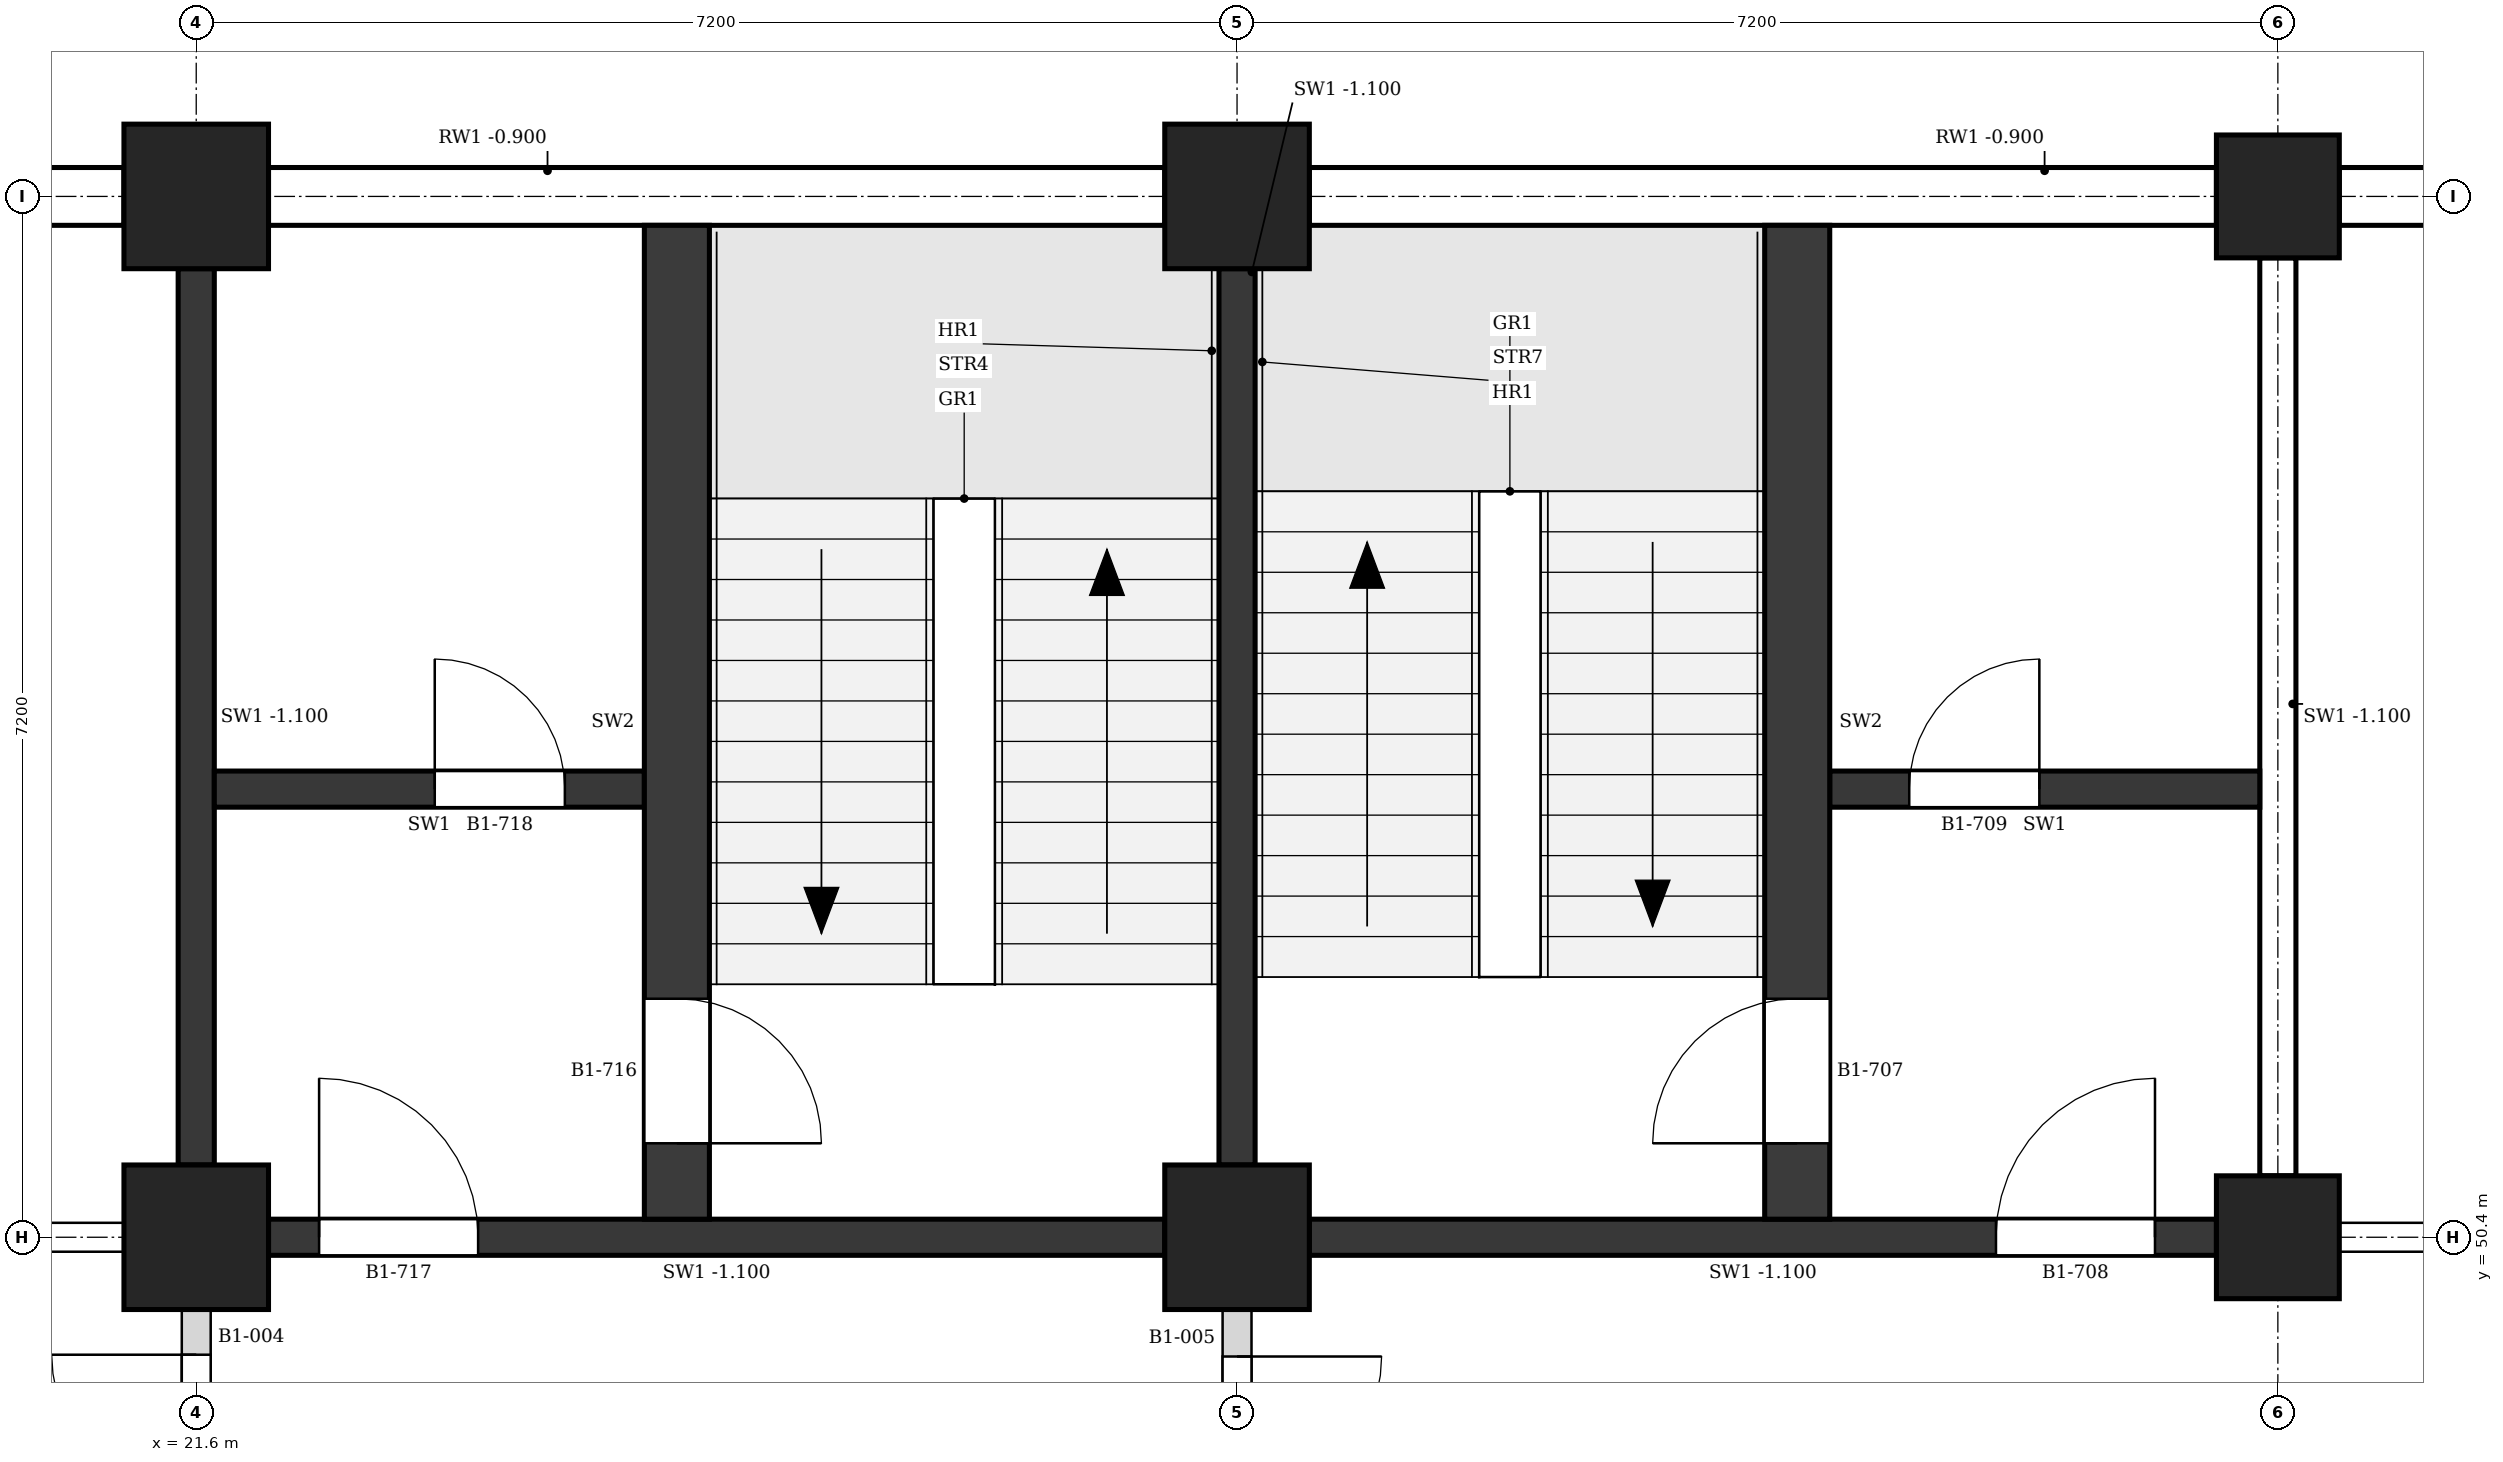
"""IFC4 building model, lengths in metres.
Left out: names, types, materials, properties, quantities, classifications, styles, units other than length and angle.
Written with IfcOpenShell. Run it as: python <this file> out.ifc"""

import sys

from ifc_helpers import new_model, si_unit, direction, frame, frame_2d, origin, origin_2d, place, context, subcontext, project, spatial, rectangle, extrude, element, fill, save


model = new_model("IFC4")
c1 = context("Model", 3, precision=1e-05, world=origin(), true_north=direction((0.0, 1.0)))
c2 = subcontext(c1, "Body", "Model", "MODEL_VIEW")
j1 = project(units=[si_unit("LENGTHUNIT", "METRE"), si_unit("PLANEANGLEUNIT", "RADIAN")], contexts=[c1])
p1 = place(None, origin())
s1 = spatial("IfcSite", under=j1, at=p1, CompositionType="ELEMENT")
p2 = place(p1, origin())
s2 = spatial("IfcBuilding", under=s1, at=p2, CompositionType="ELEMENT")
p3 = place(p2, frame((0.0, 0.0, -4.5)))
s3 = spatial("IfcBuildingStorey", under=s2, at=p3, CompositionType="ELEMENT", Elevation=-4.5)
for number, where, z_axis, x_axis in (
    (1, (21.6, 50.4, 0.0), (0.0, 0.0, 1.0), (1.0, 0.0, 0.0)),
    (2, (21.6, 57.6, 0.0), (0.0, 0.0, 1.0), (1.0, 0.0, 0.0)),
    (3, (28.8, 50.4, 0.0), (0.0, 0.0, 1.0), (1.0, 0.0, 0.0)),
    (4, (28.8, 57.6, 0.0), (0.0, 0.0, 1.0), (1.0, 0.0, 0.0)),
):
    element("IfcColumn", number, at=place(p3, frame(where, z_axis=z_axis, x_axis=x_axis)), inside=s3, PredefinedType="COLUMN", context=c2, shape_type="SweptSolid", body=[
        extrude(rectangle(XDim=1.0, YDim=1.0, at=origin_2d()), origin(), (0.0, 0.0, 1.0), 4.5),
    ])
for number, where, z_axis, x_axis in (
    (5, (36.0, 50.4, 0.0), (0.0, 0.0, 1.0), (1.0, 0.0, 0.0)),
    (6, (36.0, 57.6, 0.0), (0.0, 0.0, 1.0), (1.0, 0.0, 0.0)),
):
    element("IfcColumn", number, at=place(p3, frame(where, z_axis=z_axis, x_axis=x_axis)), inside=s3, PredefinedType="COLUMN", context=c2, shape_type="SweptSolid", body=[
        extrude(rectangle(XDim=0.85, YDim=0.85, at=origin_2d()), origin(), (0.0, 0.0, 1.0), 4.5),
    ])
p4 = place(p3, frame((42.775, 57.6, 0.0), z_axis=(0.0, 0.0, 1.0), x_axis=(-1.0, 0.0, 0.0)))
e7 = element("IfcWall", 7, at=p4, inside=s3, PredefinedType="SOLIDWALL", context=c2, shape_type="SweptSolid", body=[
    extrude(rectangle(XDim=6.35, YDim=0.4, at=frame_2d((3.175, 0.0))), origin(), (0.0, 0.0, 1.0), 3.6),
])
p5 = place(p3, frame((35.575, 57.6, 0.0), z_axis=(0.0, 0.0, 1.0), x_axis=(-1.0, 0.0, 0.0)))
e8 = element("IfcWall", 8, at=p5, inside=s3, PredefinedType="SOLIDWALL", context=c2, shape_type="SweptSolid", body=[
    extrude(rectangle(XDim=6.275, YDim=0.4, at=frame_2d((3.137, 0.0))), origin(), (0.0, 0.0, 1.0), 3.6),
])
p6 = place(p3, frame((28.3, 57.6, 0.0), z_axis=(0.0, 0.0, 1.0), x_axis=(-1.0, 0.0, 0.0)))
e9 = element("IfcWall", 9, at=p6, inside=s3, PredefinedType="SOLIDWALL", context=c2, shape_type="SweptSolid", body=[
    extrude(rectangle(XDim=6.2, YDim=0.4, at=frame_2d((3.1, 0.0))), origin(), (0.0, 0.0, 1.0), 3.6),
])
p7 = place(p3, frame((21.1, 57.6, 0.0), z_axis=(0.0, 0.0, 1.0), x_axis=(-1.0, 0.0, 0.0)))
e10 = element("IfcWall", 10, at=p7, inside=s3, PredefinedType="SOLIDWALL", context=c2, shape_type="SweptSolid", body=[
    extrude(rectangle(XDim=6.2, YDim=0.4, at=frame_2d((3.1, 0.0))), origin(), (0.0, 0.0, 1.0), 3.6),
])
p8 = place(p3, frame((29.3, 50.4, 0.0), z_axis=(0.0, 0.0, 1.0), x_axis=(1.0, 0.0, 0.0)))
e11 = element("IfcWall", 11, at=p8, inside=s3, PredefinedType="SHEAR", context=c2, shape_type="SweptSolid", body=[
    extrude(rectangle(XDim=6.275, YDim=0.25, at=frame_2d((3.137, 0.0))), origin(), (0.0, 0.0, 1.0), 3.4),
])
p9 = place(p8, frame((4.75, 0.0, 0.0)))
e12 = element("IfcOpeningElement", 12, at=p9, cuts=e11, PredefinedType="OPENING", context=c2, shape_type="SweptSolid", body=[
    extrude(rectangle(XDim=1.1, YDim=2.1, at=frame_2d((0.55, 1.05))), frame((0.0, 0.135, 0.0), z_axis=(0.0, -1.0, 0.0), x_axis=(1.0, 0.0, 0.0)), (0.0, 0.0, 1.0), 0.27),
])
p10 = place(p3, frame((28.8, 50.9, 0.0), z_axis=(0.0, 0.0, 1.0), x_axis=(0.0, 1.0, 0.0)))
e13 = element("IfcWall", 13, at=p10, inside=s3, PredefinedType="SHEAR", context=c2, shape_type="SweptSolid", body=[
    extrude(rectangle(XDim=6.2, YDim=0.25, at=frame_2d((3.1, 0.0))), origin(), (0.0, 0.0, 1.0), 3.4),
])
p11 = place(p3, frame((36.0, 50.825, 0.0), z_axis=(0.0, 0.0, 1.0), x_axis=(0.0, 1.0, 0.0)))
e14 = element("IfcWall", 14, at=p11, inside=s3, PredefinedType="SHEAR", context=c2, shape_type="SweptSolid", body=[
    extrude(rectangle(XDim=6.35, YDim=0.25, at=frame_2d((3.175, 0.0))), origin(), (0.0, 0.0, 1.0), 3.4),
])
p12 = place(p3, frame((32.675, 50.525, 0.0), z_axis=(0.0, 0.0, 1.0), x_axis=(0.0, 1.0, 0.0)))
e15 = element("IfcWall", 15, at=p12, inside=s3, PredefinedType="SHEAR", context=c2, shape_type="SweptSolid", body=[
    extrude(rectangle(XDim=6.875, YDim=0.45, at=frame_2d((3.438, 0.0))), origin(), (0.0, 0.0, 1.0), 4.2),
])
p13 = place(p12, frame((0.525, 0.0, 0.0)))
e16 = element("IfcOpeningElement", 16, at=p13, cuts=e15, PredefinedType="OPENING", context=c2, shape_type="SweptSolid", body=[
    extrude(rectangle(XDim=1.0, YDim=2.1, at=frame_2d((0.5, 1.05))), frame((0.0, 0.235, 0.0), z_axis=(0.0, -1.0, 0.0), x_axis=(1.0, 0.0, 0.0)), (0.0, 0.0, 1.0), 0.47),
])
p14 = place(p3, frame((32.9, 53.5, 0.0), z_axis=(0.0, 0.0, 1.0), x_axis=(1.0, 0.0, 0.0)))
e17 = element("IfcWall", 17, at=p14, inside=s3, PredefinedType="SHEAR", context=c2, shape_type="SweptSolid", body=[
    extrude(rectangle(XDim=2.975, YDim=0.25, at=frame_2d((1.488, 0.0))), origin(), (0.0, 0.0, 1.0), 4.2),
])
p15 = place(p14, frame((0.55, 0.0, 0.0)))
e18 = element("IfcOpeningElement", 18, at=p15, cuts=e17, PredefinedType="OPENING", context=c2, shape_type="SweptSolid", body=[
    extrude(rectangle(XDim=0.9, YDim=2.1, at=frame_2d((0.45, 1.05))), frame((0.0, 0.135, 0.0), z_axis=(0.0, -1.0, 0.0), x_axis=(1.0, 0.0, 0.0)), (0.0, 0.0, 1.0), 0.27),
])
p16 = place(p3, frame((22.1, 50.4, 0.0), z_axis=(0.0, 0.0, 1.0), x_axis=(1.0, 0.0, 0.0)))
e19 = element("IfcWall", 19, at=p16, inside=s3, PredefinedType="SHEAR", context=c2, shape_type="SweptSolid", body=[
    extrude(rectangle(XDim=6.2, YDim=0.25, at=frame_2d((3.1, 0.0))), origin(), (0.0, 0.0, 1.0), 3.4),
])
p17 = place(p16, frame((0.35, 0.0, 0.0)))
e20 = element("IfcOpeningElement", 20, at=p17, cuts=e19, PredefinedType="OPENING", context=c2, shape_type="SweptSolid", body=[
    extrude(rectangle(XDim=1.1, YDim=2.1, at=frame_2d((0.55, 1.05))), frame((0.0, 0.135, 0.0), z_axis=(0.0, -1.0, 0.0), x_axis=(1.0, 0.0, 0.0)), (0.0, 0.0, 1.0), 0.27),
])
p18 = place(p3, frame((21.6, 50.9, 0.0), z_axis=(0.0, 0.0, 1.0), x_axis=(0.0, 1.0, 0.0)))
e21 = element("IfcWall", 21, at=p18, inside=s3, PredefinedType="SHEAR", context=c2, shape_type="SweptSolid", body=[
    extrude(rectangle(XDim=6.2, YDim=0.25, at=frame_2d((3.1, 0.0))), origin(), (0.0, 0.0, 1.0), 3.4),
])
p19 = place(p3, frame((24.925, 50.525, 0.0), z_axis=(0.0, 0.0, 1.0), x_axis=(0.0, 1.0, 0.0)))
e22 = element("IfcWall", 22, at=p19, inside=s3, PredefinedType="SHEAR", context=c2, shape_type="SweptSolid", body=[
    extrude(rectangle(XDim=6.875, YDim=0.45, at=frame_2d((3.438, 0.0))), origin(), (0.0, 0.0, 1.0), 4.2),
])
p20 = place(p19, frame((0.525, 0.0, 0.0)))
e23 = element("IfcOpeningElement", 23, at=p20, cuts=e22, PredefinedType="OPENING", context=c2, shape_type="SweptSolid", body=[
    extrude(rectangle(XDim=1.0, YDim=2.1, at=frame_2d((0.5, 1.05))), frame((0.0, 0.235, 0.0), z_axis=(0.0, -1.0, 0.0), x_axis=(1.0, 0.0, 0.0)), (0.0, 0.0, 1.0), 0.47),
])
p21 = place(p3, frame((21.725, 53.5, 0.0), z_axis=(0.0, 0.0, 1.0), x_axis=(1.0, 0.0, 0.0)))
e24 = element("IfcWall", 24, at=p21, inside=s3, PredefinedType="SHEAR", context=c2, shape_type="SweptSolid", body=[
    extrude(rectangle(XDim=2.975, YDim=0.25, at=frame_2d((1.487, 0.0))), origin(), (0.0, 0.0, 1.0), 4.2),
])
p22 = place(p21, frame((1.525, 0.0, 0.0)))
e25 = element("IfcOpeningElement", 25, at=p22, cuts=e24, PredefinedType="OPENING", context=c2, shape_type="SweptSolid", body=[
    extrude(rectangle(XDim=0.9, YDim=2.1, at=frame_2d((0.45, 1.05))), frame((0.0, 0.135, 0.0), z_axis=(0.0, -1.0, 0.0), x_axis=(1.0, 0.0, 0.0)), (0.0, 0.0, 1.0), 0.27),
])
p23 = place(p3, frame((14.9, 50.4, 0.0), z_axis=(0.0, 0.0, 1.0), x_axis=(1.0, 0.0, 0.0)))
e26 = element("IfcWall", 26, at=p23, inside=s3, PredefinedType="PARTITIONING", context=c2, shape_type="SweptSolid", body=[
    extrude(rectangle(XDim=6.2, YDim=0.2, at=frame_2d((3.1, 0.0))), origin(), (0.0, 0.0, 1.0), 3.4),
])
p24 = place(p23, frame((2.6, 0.0, 0.0)))
e27 = element("IfcOpeningElement", 27, at=p24, cuts=e26, PredefinedType="OPENING", context=c2, shape_type="SweptSolid", body=[
    extrude(rectangle(XDim=1.0, YDim=2.1, at=frame_2d((0.5, 1.05))), frame((0.0, 0.11, 0.0), z_axis=(0.0, -1.0, 0.0), x_axis=(1.0, 0.0, 0.0)), (0.0, 0.0, 1.0), 0.22),
])
p25 = place(p3, frame((36.425, 50.4, 0.0), z_axis=(0.0, 0.0, 1.0), x_axis=(1.0, 0.0, 0.0)))
e28 = element("IfcWall", 28, at=p25, inside=s3, PredefinedType="SOLIDWALL", context=c2, shape_type="SweptSolid", body=[
    extrude(rectangle(XDim=6.35, YDim=0.2, at=frame_2d((3.175, 0.0))), origin(), (0.0, 0.0, 1.0), 3.4),
])
p26 = place(p3, frame((21.6, 47.275, 0.0), z_axis=(0.0, 0.0, 1.0), x_axis=(0.0, 1.0, 0.0)))
e29 = element("IfcWall", 29, at=p26, inside=s3, PredefinedType="PARTITIONING", context=c2, shape_type="SweptSolid", body=[
    extrude(rectangle(XDim=2.625, YDim=0.2, at=frame_2d((1.312, 0.0))), origin(), (0.0, 0.0, 1.0), 3.4),
])
p27 = place(p26, frame((0.312, 0.0, 0.0)))
e30 = element("IfcOpeningElement", 30, at=p27, cuts=e29, PredefinedType="OPENING", context=c2, shape_type="SweptSolid", body=[
    extrude(rectangle(XDim=2.0, YDim=2.4, at=frame_2d((1.0, 1.2))), frame((0.0, 0.11, 0.0), z_axis=(0.0, -1.0, 0.0), x_axis=(1.0, 0.0, 0.0)), (0.0, 0.0, 1.0), 0.22),
])
p28 = place(p3, frame((28.8, 47.25, 0.0), z_axis=(0.0, 0.0, 1.0), x_axis=(0.0, 1.0, 0.0)))
e31 = element("IfcWall", 31, at=p28, inside=s3, PredefinedType="PARTITIONING", context=c2, shape_type="SweptSolid", body=[
    extrude(rectangle(XDim=2.65, YDim=0.2, at=frame_2d((1.325, 0.0))), origin(), (0.0, 0.0, 1.0), 3.4),
])
p29 = place(p28, frame((0.325, 0.0, 0.0)))
e32 = element("IfcOpeningElement", 32, at=p29, cuts=e31, PredefinedType="OPENING", context=c2, shape_type="SweptSolid", body=[
    extrude(rectangle(XDim=2.0, YDim=2.4, at=frame_2d((1.0, 1.2))), frame((0.0, 0.11, 0.0), z_axis=(0.0, -1.0, 0.0), x_axis=(1.0, 0.0, 0.0)), (0.0, 0.0, 1.0), 0.22),
])
p30 = place(p13, origin())
e33 = element("IfcDoor", 33, at=p30, inside=s3, OperationType="SINGLE_SWING_LEFT", PredefinedType="DOOR", context=c2, shape_type="SweptSolid", body=[
    extrude(rectangle(XDim=1.0, YDim=2.1, at=frame_2d((0.5, 1.05))), frame((0.0, 0.025, 0.0), z_axis=(0.0, -1.0, 0.0), x_axis=(1.0, 0.0, 0.0)), (0.0, 0.0, 1.0), 0.05),
])
fill(e16, e33)
p31 = place(p9, origin())
e34 = element("IfcDoor", 34, at=p31, inside=s3, OperationType="SINGLE_SWING_RIGHT", PredefinedType="DOOR", context=c2, shape_type="SweptSolid", body=[
    extrude(rectangle(XDim=1.1, YDim=2.1, at=frame_2d((0.55, 1.05))), frame((0.0, 0.025, 0.0), z_axis=(0.0, -1.0, 0.0), x_axis=(1.0, 0.0, 0.0)), (0.0, 0.0, 1.0), 0.05),
])
fill(e12, e34)
p32 = place(p15, origin())
e35 = element("IfcDoor", 35, at=p32, inside=s3, OperationType="SINGLE_SWING_RIGHT", PredefinedType="DOOR", context=c2, shape_type="SweptSolid", body=[
    extrude(rectangle(XDim=0.9, YDim=2.1, at=frame_2d((0.45, 1.05))), frame((0.0, 0.025, 0.0), z_axis=(0.0, -1.0, 0.0), x_axis=(1.0, 0.0, 0.0)), (0.0, 0.0, 1.0), 0.05),
])
fill(e18, e35)
p33 = place(p20, frame((1.0, 0.0, 0.0), z_axis=(0.0, 0.0, 1.0), x_axis=(-1.0, 0.0, 0.0)))
e36 = element("IfcDoor", 36, at=p33, inside=s3, OperationType="SINGLE_SWING_RIGHT", PredefinedType="DOOR", context=c2, shape_type="SweptSolid", body=[
    extrude(rectangle(XDim=1.0, YDim=2.1, at=frame_2d((0.5, 1.05))), frame((0.0, 0.025, 0.0), z_axis=(0.0, -1.0, 0.0), x_axis=(1.0, 0.0, 0.0)), (0.0, 0.0, 1.0), 0.05),
])
fill(e23, e36)
p34 = place(p17, origin())
e37 = element("IfcDoor", 37, at=p34, inside=s3, OperationType="SINGLE_SWING_LEFT", PredefinedType="DOOR", context=c2, shape_type="SweptSolid", body=[
    extrude(rectangle(XDim=1.1, YDim=2.1, at=frame_2d((0.55, 1.05))), frame((0.0, 0.025, 0.0), z_axis=(0.0, -1.0, 0.0), x_axis=(1.0, 0.0, 0.0)), (0.0, 0.0, 1.0), 0.05),
])
fill(e20, e37)
p35 = place(p22, origin())
e38 = element("IfcDoor", 38, at=p35, inside=s3, OperationType="SINGLE_SWING_LEFT", PredefinedType="DOOR", context=c2, shape_type="SweptSolid", body=[
    extrude(rectangle(XDim=0.9, YDim=2.1, at=frame_2d((0.45, 1.05))), frame((0.0, 0.025, 0.0), z_axis=(0.0, -1.0, 0.0), x_axis=(1.0, 0.0, 0.0)), (0.0, 0.0, 1.0), 0.05),
])
fill(e25, e38)
p36 = place(p27, origin())
e39 = element("IfcDoor", 39, at=p36, inside=s3, OperationType="DOUBLE_DOOR_SINGLE_SWING", PredefinedType="DOOR", context=c2, shape_type="SweptSolid", body=[
    extrude(rectangle(XDim=2.0, YDim=2.4, at=frame_2d((1.0, 1.2))), frame((0.0, 0.025, 0.0), z_axis=(0.0, -1.0, 0.0), x_axis=(1.0, 0.0, 0.0)), (0.0, 0.0, 1.0), 0.05),
])
fill(e30, e39)
p37 = place(p29, origin())
e40 = element("IfcDoor", 40, at=p37, inside=s3, OperationType="DOUBLE_DOOR_SINGLE_SWING", PredefinedType="DOOR", context=c2, shape_type="SweptSolid", body=[
    extrude(rectangle(XDim=2.0, YDim=2.4, at=frame_2d((1.0, 1.2))), frame((0.0, 0.025, 0.0), z_axis=(0.0, -1.0, 0.0), x_axis=(1.0, 0.0, 0.0)), (0.0, 0.0, 1.0), 0.05),
])
fill(e32, e40)
save(model, sys.argv[1])
